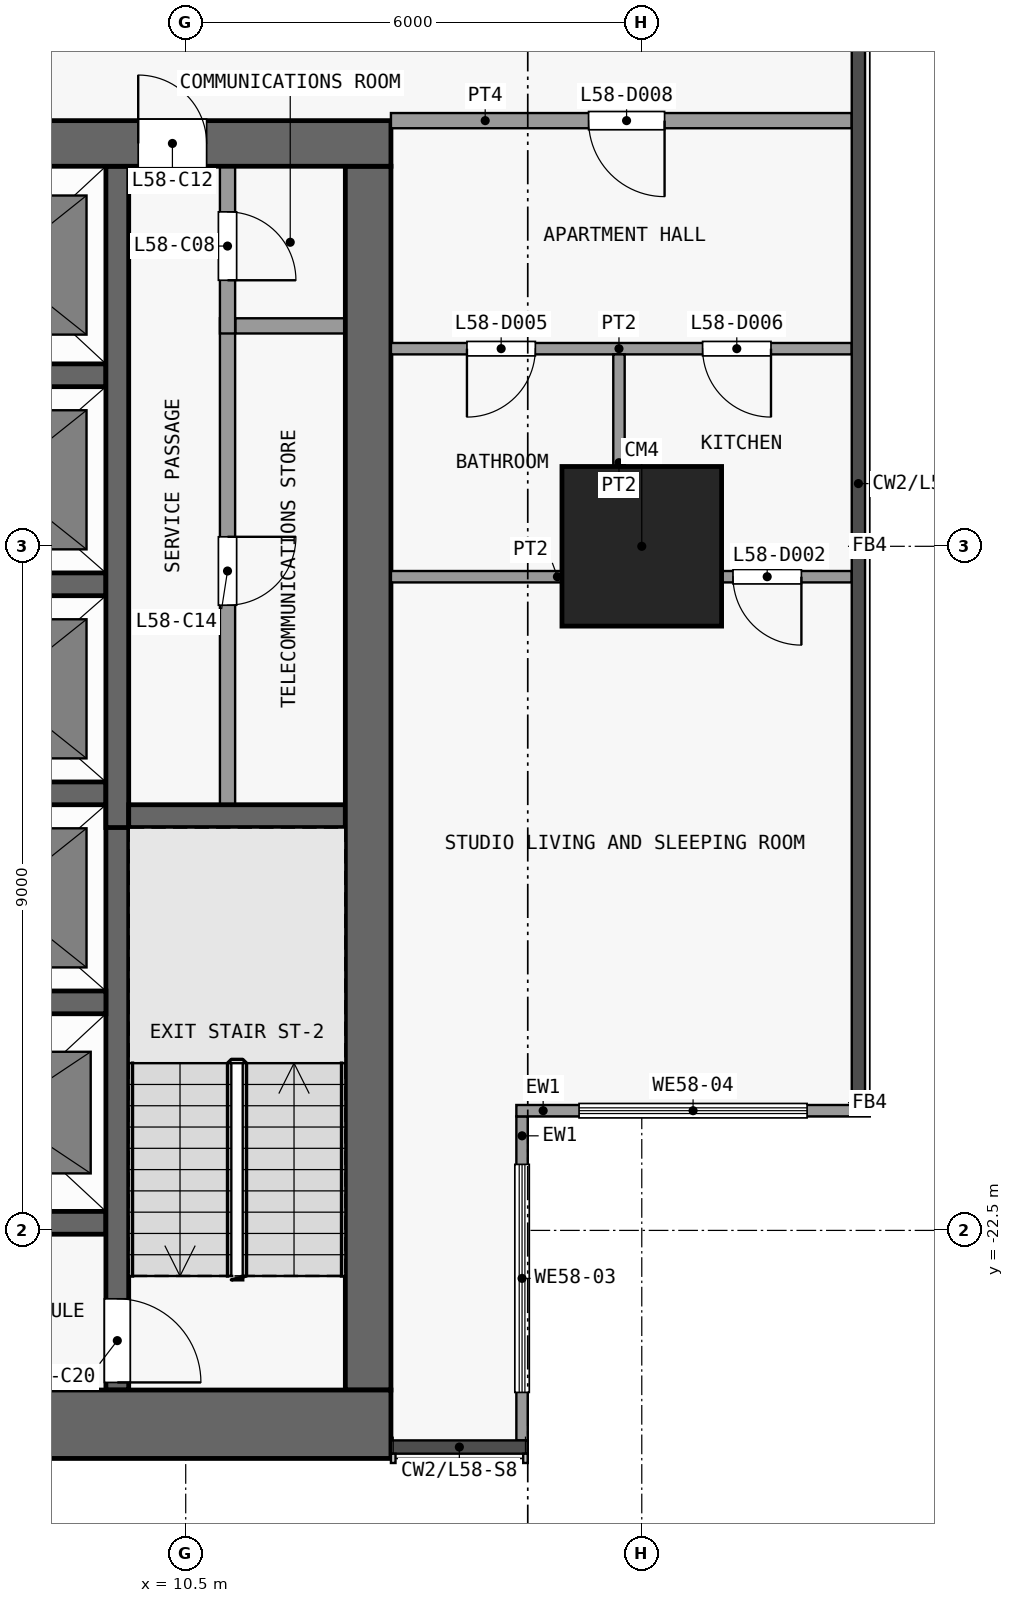
"""IFC4 building model, lengths in metres.
Left out: names, types, materials, properties, quantities, classifications, styles, units other than length and angle.
Written with IfcOpenShell. Run it as: python <this file> out.ifc"""

import sys

from ifc_helpers import new_model, si_unit, direction, frame, frame_2d, origin, origin_2d, place, context, subcontext, project, spatial, rectangle, extrude, element, fill, save


model = new_model("IFC4")
c1 = context("Model", 3, precision=1e-05, world=origin(), true_north=direction((0.0, 1.0)))
c2 = subcontext(c1, "Body", "Model", "MODEL_VIEW")
j1 = project(units=[si_unit("LENGTHUNIT", "METRE"), si_unit("PLANEANGLEUNIT", "RADIAN")], contexts=[c1])
p1 = place(None, origin())
s1 = spatial("IfcSite", under=j1, at=p1, CompositionType="ELEMENT")
p2 = place(p1, origin())
s2 = spatial("IfcBuilding", under=s1, at=p2, CompositionType="ELEMENT")
p3 = place(p2, frame((0.0, 0.0, 230.3)))
s3 = spatial("IfcBuildingStorey", under=s2, at=p3, CompositionType="ELEMENT", Elevation=230.3)
p4 = place(p3, frame((16.5, -13.5, 0.0), z_axis=(0.0, 0.0, 1.0), x_axis=(1.0, 0.0, 0.0)))
e1 = element("IfcColumn", 1, at=p4, inside=s3, PredefinedType="COLUMN", context=c2, shape_type="SweptSolid", body=[
    extrude(rectangle(XDim=2.1, YDim=2.1, at=origin_2d()), origin(), (0.0, 0.0, 1.0), 3.6),
])
p5 = place(p3, frame((-13.2, -25.05, 0.0), z_axis=(0.0, 0.0, 1.0), x_axis=(1.0, 0.0, 0.0)))
e2 = element("IfcWall", 2, at=p5, inside=s3, PredefinedType="SHEAR", context=c2, shape_type="SweptSolid", body=[
    extrude(rectangle(XDim=26.4, YDim=0.9, at=frame_2d((13.2, 0.0))), origin(), (0.0, 0.0, 1.0), 3.3),
])
p6 = place(p3, frame((-13.2, -8.2, 0.0), z_axis=(0.0, 0.0, 1.0), x_axis=(1.0, 0.0, 0.0)))
e3 = element("IfcWall", 3, at=p6, inside=s3, PredefinedType="SHEAR", context=c2, shape_type="SweptSolid", body=[
    extrude(rectangle(XDim=26.4, YDim=0.6, at=frame_2d((13.2, 0.0))), origin(), (0.0, 0.0, 1.0), 3.3),
])
p7 = place(p6, frame((7.5, 0.0, 0.0)))
e4 = element("IfcOpeningElement", 4, at=p7, cuts=e3, PredefinedType="OPENING", context=c2, shape_type="SweptSolid", body=[
    extrude(rectangle(XDim=1.8, YDim=2.1, at=frame_2d((0.9, 1.05))), frame((0.0, 0.31, 0.0), z_axis=(0.0, -1.0, 0.0), x_axis=(1.0, 0.0, 0.0)), (0.0, 0.0, 1.0), 0.62),
])
p8 = place(p6, frame((17.1, 0.0, 0.0)))
e5 = element("IfcOpeningElement", 5, at=p8, cuts=e3, PredefinedType="OPENING", context=c2, shape_type="SweptSolid", body=[
    extrude(rectangle(XDim=1.8, YDim=2.1, at=frame_2d((0.9, 1.05))), frame((0.0, 0.31, 0.0), z_axis=(0.0, -1.0, 0.0), x_axis=(1.0, 0.0, 0.0)), (0.0, 0.0, 1.0), 0.62),
])
p9 = place(p6, frame((2.425, 0.0, 0.0)))
e6 = element("IfcOpeningElement", 6, at=p9, cuts=e3, PredefinedType="OPENING", context=c2, shape_type="SweptSolid", body=[
    extrude(rectangle(XDim=0.9, YDim=2.1, at=frame_2d((0.45, 1.05))), frame((0.0, 0.31, 0.0), z_axis=(0.0, -1.0, 0.0), x_axis=(1.0, 0.0, 0.0)), (0.0, 0.0, 1.0), 0.62),
])
p10 = place(p6, frame((23.075, 0.0, 0.0)))
e7 = element("IfcOpeningElement", 7, at=p10, cuts=e3, PredefinedType="OPENING", context=c2, shape_type="SweptSolid", body=[
    extrude(rectangle(XDim=0.9, YDim=2.1, at=frame_2d((0.45, 1.05))), frame((0.0, 0.31, 0.0), z_axis=(0.0, -1.0, 0.0), x_axis=(1.0, 0.0, 0.0)), (0.0, 0.0, 1.0), 0.62),
])
p11 = place(p3, frame((12.9, -24.6, 0.0), z_axis=(0.0, 0.0, 1.0), x_axis=(0.0, 1.0, 0.0)))
e8 = element("IfcWall", 8, at=p11, inside=s3, PredefinedType="SHEAR", context=c2, shape_type="SweptSolid", body=[
    extrude(rectangle(XDim=16.1, YDim=0.6, at=frame_2d((8.05, 0.0))), origin(), (0.0, 0.0, 1.0), 3.3),
])
for number, where, z_axis, x_axis in (
    (9, (6.65, -22.4, 0.0), (0.0, 0.0, 1.0), (1.0, 0.0, 0.0)),
    (10, (6.65, -19.5, 0.0), (0.0, 0.0, 1.0), (1.0, 0.0, 0.0)),
):
    element("IfcWall", number, at=place(p3, frame(where, z_axis=z_axis, x_axis=x_axis)), inside=s3, PredefinedType="SHEAR", context=c2, shape_type="SweptSolid", body=[
        extrude(rectangle(XDim=2.8, YDim=0.3, at=frame_2d((1.4, 0.0))), origin(), (0.0, 0.0, 1.0), 3.3),
    ])
p12 = place(p3, frame((9.75, -17.05, 0.0), z_axis=(0.0, 0.0, 1.0), x_axis=(1.0, 0.0, 0.0)))
e11 = element("IfcWall", 11, at=p12, inside=s3, PredefinedType="SHEAR", context=c2, shape_type="SweptSolid", body=[
    extrude(rectangle(XDim=2.85, YDim=0.3, at=frame_2d((1.425, 0.0))), origin(), (0.0, 0.0, 1.0), 3.3),
])
for number, where, z_axis, x_axis in (
    (12, (6.65, -16.75, 0.0), (0.0, 0.0, 1.0), (1.0, 0.0, 0.0)),
    (13, (6.65, -14.0, 0.0), (0.0, 0.0, 1.0), (1.0, 0.0, 0.0)),
    (14, (6.65, -11.25, 0.0), (0.0, 0.0, 1.0), (1.0, 0.0, 0.0)),
):
    element("IfcWall", number, at=place(p3, frame(where, z_axis=z_axis, x_axis=x_axis)), inside=s3, PredefinedType="SHEAR", context=c2, shape_type="SweptSolid", body=[
        extrude(rectangle(XDim=2.8, YDim=0.3, at=frame_2d((1.4, 0.0))), origin(), (0.0, 0.0, 1.0), 3.3),
    ])
p13 = place(p3, frame((11.15, -10.6, 0.0), z_axis=(0.0, 0.0, 1.0), x_axis=(1.0, 0.0, 0.0)))
e15 = element("IfcWall", 15, at=p13, inside=s3, PredefinedType="PARTITIONING", context=c2, shape_type="SweptSolid", body=[
    extrude(rectangle(XDim=1.45, YDim=0.2, at=frame_2d((0.725, 0.0))), origin(), (0.0, 0.0, 1.0), 3.3),
])
p14 = place(p3, frame((9.6, -16.9, 0.0), z_axis=(0.0, 0.0, 1.0), x_axis=(0.0, -1.0, 0.0)))
e16 = element("IfcWall", 16, at=p14, inside=s3, PredefinedType="SHEAR", context=c2, shape_type="SweptSolid", body=[
    extrude(rectangle(XDim=7.7, YDim=0.3, at=frame_2d((3.85, 0.0))), origin(), (0.0, 0.0, 1.0), 3.3),
])
p15 = place(p14, frame((6.5, 0.0, 0.0)))
e17 = element("IfcOpeningElement", 17, at=p15, cuts=e16, PredefinedType="OPENING", context=c2, shape_type="SweptSolid", body=[
    extrude(rectangle(XDim=1.1, YDim=2.1, at=frame_2d((0.55, 1.05))), frame((0.0, 0.16, 0.0), z_axis=(0.0, -1.0, 0.0), x_axis=(1.0, 0.0, 0.0)), (0.0, 0.0, 1.0), 0.32),
])
p16 = place(p3, frame((9.6, -17.2, 0.0), z_axis=(0.0, 0.0, 1.0), x_axis=(0.0, 1.0, 0.0)))
e18 = element("IfcWall", 18, at=p16, inside=s3, PredefinedType="SHEAR", context=c2, shape_type="SweptSolid", body=[
    extrude(rectangle(XDim=8.7, YDim=0.3, at=frame_2d((4.35, 0.0))), origin(), (0.0, 0.0, 1.0), 3.3),
])
p17 = place(p3, frame((11.05, -10.5, 0.0), z_axis=(0.0, 0.0, 1.0), x_axis=(0.0, -1.0, 0.0)))
e19 = element("IfcWall", 19, at=p17, inside=s3, PredefinedType="PARTITIONING", context=c2, shape_type="SweptSolid", body=[
    extrude(rectangle(XDim=6.4, YDim=0.2, at=frame_2d((3.2, 0.0))), origin(), (0.0, 0.0, 1.0), 3.3),
])
p18 = place(p17, frame((2.875, 0.0, 0.0)))
e20 = element("IfcOpeningElement", 20, at=p18, cuts=e19, PredefinedType="OPENING", context=c2, shape_type="SweptSolid", body=[
    extrude(rectangle(XDim=0.9, YDim=2.1, at=frame_2d((0.45, 1.05))), frame((0.0, 0.11, 0.0), z_axis=(0.0, -1.0, 0.0), x_axis=(1.0, 0.0, 0.0)), (0.0, 0.0, 1.0), 0.22),
])
p19 = place(p3, frame((11.05, -8.5, 0.0), z_axis=(0.0, 0.0, 1.0), x_axis=(0.0, -1.0, 0.0)))
e21 = element("IfcWall", 21, at=p19, inside=s3, PredefinedType="PARTITIONING", context=c2, shape_type="SweptSolid", body=[
    extrude(rectangle(XDim=2.2, YDim=0.2, at=frame_2d((1.1, 0.0))), origin(), (0.0, 0.0, 1.0), 3.3),
])
p20 = place(p19, frame((0.6, 0.0, 0.0)))
e22 = element("IfcOpeningElement", 22, at=p20, cuts=e21, PredefinedType="OPENING", context=c2, shape_type="SweptSolid", body=[
    extrude(rectangle(XDim=0.9, YDim=2.1, at=frame_2d((0.45, 1.05))), frame((0.0, 0.11, 0.0), z_axis=(0.0, -1.0, 0.0), x_axis=(1.0, 0.0, 0.0)), (0.0, 0.0, 1.0), 0.22),
])
p21 = place(p3, frame((14.925, -21.0, 0.0), z_axis=(0.0, 0.0, 1.0), x_axis=(0.0, -1.0, 0.0)))
e23 = element("IfcWall", 23, at=p21, inside=s3, PredefinedType="SOLIDWALL", context=c2, shape_type="SweptSolid", body=[
    extrude(rectangle(XDim=4.262, YDim=0.15, at=frame_2d((2.131, 0.0))), origin(), (0.0, 0.0, 1.0), 3.3),
])
p22 = place(p21, frame((0.631, 0.0, 0.9)))
e24 = element("IfcOpeningElement", 24, at=p22, cuts=e23, PredefinedType="OPENING", context=c2, shape_type="SweptSolid", body=[
    extrude(rectangle(XDim=3.0, YDim=2.4, at=frame_2d((1.5, 1.2))), frame((0.0, 0.085, 0.0), z_axis=(0.0, -1.0, 0.0), x_axis=(1.0, 0.0, 0.0)), (0.0, 0.0, 1.0), 0.17),
])
p23 = place(p3, frame((19.5, -20.925, 0.0), z_axis=(0.0, 0.0, 1.0), x_axis=(-1.0, 0.0, 0.0)))
e25 = element("IfcWall", 25, at=p23, inside=s3, PredefinedType="SOLIDWALL", context=c2, shape_type="SweptSolid", body=[
    extrude(rectangle(XDim=4.65, YDim=0.15, at=frame_2d((2.325, 0.0))), origin(), (0.0, 0.0, 1.0), 3.3),
])
p24 = place(p23, frame((0.825, 0.0, 0.9)))
e26 = element("IfcOpeningElement", 26, at=p24, cuts=e25, PredefinedType="OPENING", context=c2, shape_type="SweptSolid", body=[
    extrude(rectangle(XDim=3.0, YDim=2.4, at=frame_2d((1.5, 1.2))), frame((0.0, 0.085, 0.0), z_axis=(0.0, -1.0, 0.0), x_axis=(1.0, 0.0, 0.0)), (0.0, 0.0, 1.0), 0.17),
])
p25 = place(p3, frame((13.2, -13.9, 0.0), z_axis=(0.0, 0.0, 1.0), x_axis=(1.0, 0.0, 0.0)))
e27 = element("IfcWall", 27, at=p25, inside=s3, PredefinedType="PARTITIONING", context=c2, shape_type="SweptSolid", body=[
    extrude(rectangle(XDim=6.062, YDim=0.15, at=frame_2d((3.031, 0.0))), origin(), (0.0, 0.0, 1.0), 3.3),
])
p26 = place(p25, frame((4.5, 0.0, 0.0)))
e28 = element("IfcOpeningElement", 28, at=p26, cuts=e27, PredefinedType="OPENING", context=c2, shape_type="SweptSolid", body=[
    extrude(rectangle(XDim=0.9, YDim=2.1, at=frame_2d((0.45, 1.05))), frame((0.0, 0.085, 0.0), z_axis=(0.0, -1.0, 0.0), x_axis=(1.0, 0.0, 0.0)), (0.0, 0.0, 1.0), 0.17),
])
p27 = place(p3, frame((13.2, -10.9, 0.0), z_axis=(0.0, 0.0, 1.0), x_axis=(1.0, 0.0, 0.0)))
e29 = element("IfcWall", 29, at=p27, inside=s3, PredefinedType="PARTITIONING", context=c2, shape_type="SweptSolid", body=[
    extrude(rectangle(XDim=6.062, YDim=0.15, at=frame_2d((3.031, 0.0))), origin(), (0.0, 0.0, 1.0), 3.3),
])
p28 = place(p27, frame((1.0, 0.0, 0.0)))
e30 = element("IfcOpeningElement", 30, at=p28, cuts=e29, PredefinedType="OPENING", context=c2, shape_type="SweptSolid", body=[
    extrude(rectangle(XDim=0.9, YDim=2.1, at=frame_2d((0.45, 1.05))), frame((0.0, 0.085, 0.0), z_axis=(0.0, -1.0, 0.0), x_axis=(1.0, 0.0, 0.0)), (0.0, 0.0, 1.0), 0.17),
])
p29 = place(p27, frame((4.1, 0.0, 0.0)))
e31 = element("IfcOpeningElement", 31, at=p29, cuts=e29, PredefinedType="OPENING", context=c2, shape_type="SweptSolid", body=[
    extrude(rectangle(XDim=0.9, YDim=2.1, at=frame_2d((0.45, 1.05))), frame((0.0, 0.085, 0.0), z_axis=(0.0, -1.0, 0.0), x_axis=(1.0, 0.0, 0.0)), (0.0, 0.0, 1.0), 0.17),
])
p30 = place(p3, frame((13.2, -7.9, 0.0), z_axis=(0.0, 0.0, 1.0), x_axis=(1.0, 0.0, 0.0)))
e32 = element("IfcWall", 32, at=p30, inside=s3, PredefinedType="PARTITIONING", context=c2, shape_type="SweptSolid", body=[
    extrude(rectangle(XDim=6.062, YDim=0.2, at=frame_2d((3.031, 0.0))), origin(), (0.0, 0.0, 1.0), 3.3),
])
p31 = place(p30, frame((2.6, 0.0, 0.0)))
e33 = element("IfcOpeningElement", 33, at=p31, cuts=e32, PredefinedType="OPENING", context=c2, shape_type="SweptSolid", body=[
    extrude(rectangle(XDim=1.0, YDim=2.1, at=frame_2d((0.5, 1.05))), frame((0.0, 0.11, 0.0), z_axis=(0.0, -1.0, 0.0), x_axis=(1.0, 0.0, 0.0)), (0.0, 0.0, 1.0), 0.22),
])
p32 = place(p3, frame((16.2, -13.825, 0.0), z_axis=(0.0, 0.0, 1.0), x_axis=(0.0, 1.0, 0.0)))
e34 = element("IfcWall", 34, at=p32, inside=s3, PredefinedType="PARTITIONING", context=c2, shape_type="SweptSolid", body=[
    extrude(rectangle(XDim=2.85, YDim=0.15, at=frame_2d((1.425, 0.0))), origin(), (0.0, 0.0, 1.0), 3.3),
])
p33 = place(p20, origin())
e35 = element("IfcDoor", 35, at=p33, inside=s3, OperationType="SINGLE_SWING_RIGHT", PredefinedType="DOOR", context=c2, shape_type="SweptSolid", body=[
    extrude(rectangle(XDim=0.9, YDim=2.1, at=frame_2d((0.45, 1.05))), frame((0.0, 0.025, 0.0), z_axis=(0.0, -1.0, 0.0), x_axis=(1.0, 0.0, 0.0)), (0.0, 0.0, 1.0), 0.05),
])
fill(e22, e35)
p34 = place(p10, origin())
e36 = element("IfcDoor", 36, at=p34, inside=s3, OperationType="SINGLE_SWING_LEFT", PredefinedType="DOOR", context=c2, shape_type="SweptSolid", body=[
    extrude(rectangle(XDim=0.9, YDim=2.1, at=frame_2d((0.45, 1.05))), frame((0.0, 0.025, 0.0), z_axis=(0.0, -1.0, 0.0), x_axis=(1.0, 0.0, 0.0)), (0.0, 0.0, 1.0), 0.05),
])
fill(e7, e36)
p35 = place(p18, origin())
e37 = element("IfcDoor", 37, at=p35, inside=s3, OperationType="SINGLE_SWING_LEFT", PredefinedType="DOOR", context=c2, shape_type="SweptSolid", body=[
    extrude(rectangle(XDim=0.9, YDim=2.1, at=frame_2d((0.45, 1.05))), frame((0.0, 0.025, 0.0), z_axis=(0.0, -1.0, 0.0), x_axis=(1.0, 0.0, 0.0)), (0.0, 0.0, 1.0), 0.05),
])
fill(e20, e37)
p36 = place(p15, origin())
e38 = element("IfcDoor", 38, at=p36, inside=s3, OperationType="SINGLE_SWING_RIGHT", PredefinedType="DOOR", context=c2, shape_type="SweptSolid", body=[
    extrude(rectangle(XDim=1.1, YDim=2.1, at=frame_2d((0.55, 1.05))), frame((0.0, 0.025, 0.0), z_axis=(0.0, -1.0, 0.0), x_axis=(1.0, 0.0, 0.0)), (0.0, 0.0, 1.0), 0.05),
])
fill(e17, e38)
p37 = place(p22, origin())
e39 = element("IfcWindow", 39, at=p37, inside=s3, PartitioningType="SINGLE_PANEL", PredefinedType="WINDOW", context=c2, shape_type="SweptSolid", body=[
    extrude(rectangle(XDim=3.0, YDim=2.4, at=frame_2d((1.5, 1.2))), frame((0.0, 0.03, 0.0), z_axis=(0.0, -1.0, 0.0), x_axis=(1.0, 0.0, 0.0)), (0.0, 0.0, 1.0), 0.06),
])
fill(e24, e39)
p38 = place(p24, origin())
e40 = element("IfcWindow", 40, at=p38, inside=s3, PartitioningType="SINGLE_PANEL", PredefinedType="WINDOW", context=c2, shape_type="SweptSolid", body=[
    extrude(rectangle(XDim=3.0, YDim=2.4, at=frame_2d((1.5, 1.2))), frame((0.0, 0.03, 0.0), z_axis=(0.0, -1.0, 0.0), x_axis=(1.0, 0.0, 0.0)), (0.0, 0.0, 1.0), 0.06),
])
fill(e26, e40)
p39 = place(p26, origin())
e41 = element("IfcDoor", 41, at=p39, inside=s3, OperationType="SINGLE_SWING_RIGHT", PredefinedType="DOOR", context=c2, shape_type="SweptSolid", body=[
    extrude(rectangle(XDim=0.9, YDim=2.1, at=frame_2d((0.45, 1.05))), frame((0.0, 0.025, 0.0), z_axis=(0.0, -1.0, 0.0), x_axis=(1.0, 0.0, 0.0)), (0.0, 0.0, 1.0), 0.05),
])
fill(e28, e41)
p40 = place(p28, origin())
e42 = element("IfcDoor", 42, at=p40, inside=s3, OperationType="SINGLE_SWING_LEFT", PredefinedType="DOOR", context=c2, shape_type="SweptSolid", body=[
    extrude(rectangle(XDim=0.9, YDim=2.1, at=frame_2d((0.45, 1.05))), frame((0.0, 0.025, 0.0), z_axis=(0.0, -1.0, 0.0), x_axis=(1.0, 0.0, 0.0)), (0.0, 0.0, 1.0), 0.05),
])
fill(e30, e42)
p41 = place(p29, origin())
e43 = element("IfcDoor", 43, at=p41, inside=s3, OperationType="SINGLE_SWING_RIGHT", PredefinedType="DOOR", context=c2, shape_type="SweptSolid", body=[
    extrude(rectangle(XDim=0.9, YDim=2.1, at=frame_2d((0.45, 1.05))), frame((0.0, 0.025, 0.0), z_axis=(0.0, -1.0, 0.0), x_axis=(1.0, 0.0, 0.0)), (0.0, 0.0, 1.0), 0.05),
])
fill(e31, e43)
p42 = place(p31, origin())
e44 = element("IfcDoor", 44, at=p42, inside=s3, OperationType="SINGLE_SWING_RIGHT", PredefinedType="DOOR", context=c2, shape_type="SweptSolid", body=[
    extrude(rectangle(XDim=1.0, YDim=2.1, at=frame_2d((0.5, 1.05))), frame((0.0, 0.025, 0.0), z_axis=(0.0, -1.0, 0.0), x_axis=(1.0, 0.0, 0.0)), (0.0, 0.0, 1.0), 0.05),
])
fill(e33, e44)
save(model, sys.argv[1])
